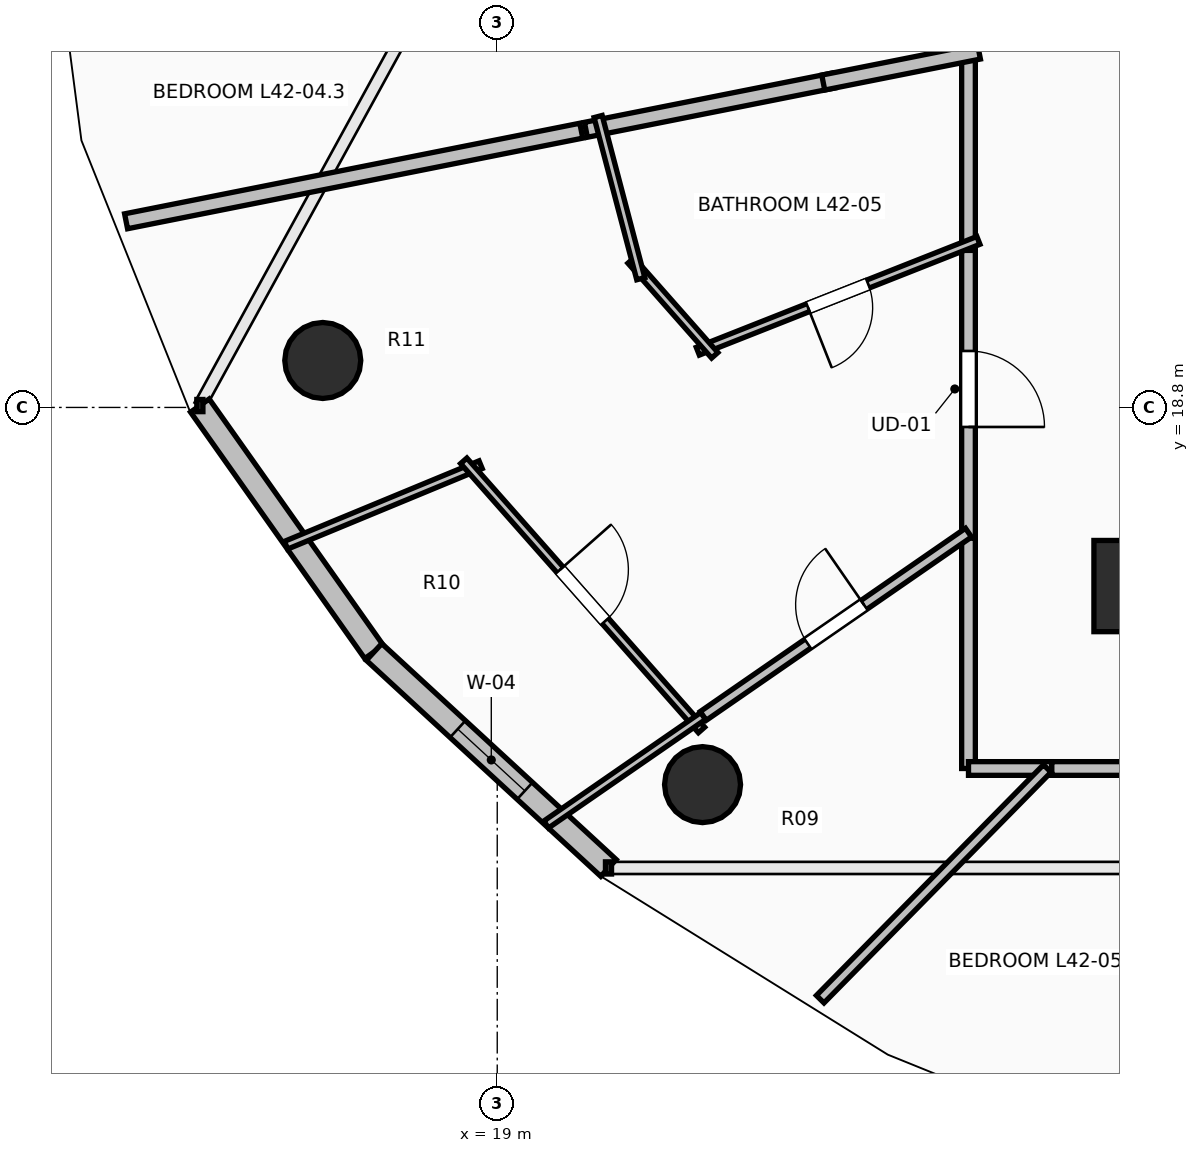
"""IFC4 building model, lengths in metres.
Left out: names, types, materials, properties, quantities, classifications, styles, units other than length and angle.
Written with IfcOpenShell. Run it as: python <this file> out.ifc"""

import sys

from ifc_helpers import new_model, si_unit, direction, frame, frame_2d, origin, origin_2d, place, context, subcontext, project, spatial, rectangle, circle, extrude, element, fill, save


model = new_model("IFC4")
c1 = context("Model", 3, precision=1e-05, world=origin(), true_north=direction((0.0, 1.0)))
c2 = subcontext(c1, "Body", "Model", "MODEL_VIEW")
j1 = project(units=[si_unit("LENGTHUNIT", "METRE"), si_unit("PLANEANGLEUNIT", "RADIAN")], contexts=[c1])
p1 = place(None, origin())
s1 = spatial("IfcSite", under=j1, at=p1, CompositionType="ELEMENT")
p2 = place(p1, origin())
s2 = spatial("IfcBuilding", under=s1, at=p2, CompositionType="ELEMENT")
p3 = place(p2, frame((0.0, 0.0, 157.1)))
s3 = spatial("IfcBuildingStorey", under=s2, at=p3, CompositionType="ELEMENT", Elevation=157.1)
for number, where, z_axis, x_axis in (
    (1, (16.705, 19.418, 0.0), (0.0, 0.0, 1.0), (-0.924, -0.383, 0.0)),
    (2, (21.701, 13.838, 0.0), (0.0, 0.0, 1.0), (-0.707, -0.707, 0.0)),
):
    element("IfcColumn", number, at=place(p3, frame(where, z_axis=z_axis, x_axis=x_axis)), inside=s3, PredefinedType="COLUMN", context=c2, shape_type="SweptSolid", body=[
        extrude(circle(Radius=0.5, at=origin_2d()), origin(), (0.0, 0.0, 1.0), 3.5),
    ])
p4 = place(p3, frame((27.25, 16.45, 0.0), z_axis=(0.0, 0.0, 1.0), x_axis=(1.0, 0.0, 0.0)))
e3 = element("IfcColumn", 3, at=p4, inside=s3, PredefinedType="PILASTER", context=c2, shape_type="SweptSolid", body=[
    extrude(rectangle(XDim=0.8, YDim=1.2, at=origin_2d()), origin(), (0.0, 0.0, 1.0), 3.5),
])
p5 = place(p3, frame((15.088, 18.825, 0.0), z_axis=(0.0, 0.0, 1.0), x_axis=(0.577269753207, -0.816553508371, 0.0)))
e4 = element("IfcWall", 4, at=p5, inside=s3, PredefinedType="STANDARD", context=c2, shape_type="SweptSolid", body=[
    extrude(rectangle(XDim=3.97, YDim=0.3, at=frame_2d((1.985, 0.0))), origin(), (0.0, 0.0, 1.0), 3.24),
])
p6 = place(p3, frame((17.38, 15.583, 0.0), z_axis=(0.0, 0.0, 1.0), x_axis=(0.735477154165, -0.677549522693, 0.0)))
e5 = element("IfcWall", 5, at=p6, inside=s3, PredefinedType="STANDARD", context=c2, shape_type="SweptSolid", body=[
    extrude(rectangle(XDim=4.194, YDim=0.3, at=frame_2d((2.097, 0.0))), origin(), (0.0, 0.0, 1.0), 3.24),
])
p7 = place(p6, frame((1.497, 0.0, 0.85)))
e6 = element("IfcOpeningElement", 6, at=p7, cuts=e5, PredefinedType="OPENING", context=c2, shape_type="SweptSolid", body=[
    extrude(rectangle(XDim=1.2, YDim=2.1, at=frame_2d((0.6, 1.05))), frame((0.0, 0.165, 0.0), z_axis=(0.0, -1.0, 0.0), x_axis=(1.0, 0.0, 0.0)), (0.0, 0.0, 1.0), 0.33),
])
p8 = place(p3, frame((25.2, 24.55, 0.0), z_axis=(0.0, 0.0, 1.0), x_axis=(0.0, -1.0, 0.0)))
e7 = element("IfcWall", 7, at=p8, inside=s3, PredefinedType="PARTITIONING", context=c2, shape_type="SweptSolid", body=[
    extrude(rectangle(XDim=1.157, YDim=0.18, at=frame_2d((0.579, 0.0))), origin(), (0.0, 0.0, 1.0), 3.24),
])
p9 = place(p3, frame((25.2, 21.006, 0.0), z_axis=(0.0, 0.0, 1.0), x_axis=(0.0, -1.0, 0.0)))
e8 = element("IfcWall", 8, at=p9, inside=s3, PredefinedType="PARTITIONING", context=c2, shape_type="SweptSolid", body=[
    extrude(rectangle(XDim=3.926, YDim=0.18, at=frame_2d((1.963, 0.0))), origin(), (0.0, 0.0, 1.0), 2.432),
])
p10 = place(p9, frame((1.463, 0.0, 0.0)))
e9 = element("IfcOpeningElement", 9, at=p10, cuts=e8, PredefinedType="OPENING", context=c2, shape_type="SweptSolid", body=[
    extrude(rectangle(XDim=1.0, YDim=2.15, at=frame_2d((0.5, 1.075))), frame((0.0, 0.105, 0.0), z_axis=(0.0, -1.0, 0.0), x_axis=(1.0, 0.0, 0.0)), (0.0, 0.0, 1.0), 0.21),
])
p11 = place(p3, frame((25.2, 23.533, 0.0), z_axis=(0.0, 0.0, 1.0), x_axis=(0.0, -1.0, 0.0)))
e10 = element("IfcWall", 10, at=p11, inside=s3, PredefinedType="PARTITIONING", context=c2, shape_type="SweptSolid", body=[
    extrude(rectangle(XDim=2.667, YDim=0.18, at=frame_2d((1.333, 0.0))), origin(), (0.0, 0.0, 1.0), 3.24),
])
p12 = place(p3, frame((25.2, 17.08, 0.0), z_axis=(0.0, 0.0, 1.0), x_axis=(0.0, -1.0, 0.0)))
e11 = element("IfcWall", 11, at=p12, inside=s3, PredefinedType="PARTITIONING", context=c2, shape_type="SweptSolid", body=[
    extrude(rectangle(XDim=3.03, YDim=0.18, at=frame_2d((1.515, 0.0))), origin(), (0.0, 0.0, 1.0), 2.432),
])
p13 = place(p3, frame((25.2, 14.05, 0.0), z_axis=(0.0, 0.0, 1.0), x_axis=(1.0, 0.0, 0.0)))
e12 = element("IfcWall", 12, at=p13, inside=s3, PredefinedType="PARTITIONING", context=c2, shape_type="SweptSolid", body=[
    extrude(rectangle(XDim=1.096, YDim=0.18, at=frame_2d((0.548, 0.0))), origin(), (0.0, 0.0, 1.0), 2.972),
])
p14 = place(p3, frame((26.296, 14.05, 0.0), z_axis=(0.0, 0.0, 1.0), x_axis=(1.0, 0.0, 0.0)))
e13 = element("IfcWall", 13, at=p14, inside=s3, PredefinedType="PARTITIONING", context=c2, shape_type="SweptSolid", body=[
    extrude(rectangle(XDim=3.779, YDim=0.18, at=frame_2d((1.89, 0.0))), origin(), (0.0, 0.0, 1.0), 2.432),
])
p15 = place(p14, frame((1.465, 0.0, 0.0)))
e14 = element("IfcOpeningElement", 14, at=p15, cuts=e13, PredefinedType="OPENING", context=c2, shape_type="SweptSolid", body=[
    extrude(rectangle(XDim=0.85, YDim=2.1, at=frame_2d((0.425, 1.05))), frame((0.0, 0.105, 0.0), z_axis=(0.0, -1.0, 0.0), x_axis=(1.0, 0.0, 0.0)), (0.0, 0.0, 1.0), 0.21),
])
p16 = place(p3, frame((14.117, 21.249, 0.0), z_axis=(0.0, 0.0, 1.0), x_axis=(0.980766298352, 0.19518572698, 0.0)))
e15 = element("IfcWall", 15, at=p16, inside=s3, PredefinedType="PARTITIONING", context=c2, shape_type="SweptSolid", body=[
    extrude(rectangle(XDim=6.106, YDim=0.2, at=frame_2d((3.053, 0.0))), origin(), (0.0, 0.0, 1.0), 2.728),
])
p17 = place(p3, frame((20.167, 22.453, 0.0), z_axis=(0.0, 0.0, 1.0), x_axis=(0.980766708229, 0.195183667423, 0.0)))
e16 = element("IfcWall", 16, at=p17, inside=s3, PredefinedType="PARTITIONING", context=c2, shape_type="SweptSolid", body=[
    extrude(rectangle(XDim=3.323, YDim=0.2, at=frame_2d((1.662, 0.0))), origin(), (0.0, 0.0, 1.0), 2.972),
])
p18 = place(p3, frame((23.289, 23.074, 0.0), z_axis=(0.0, 0.0, 1.0), x_axis=(0.980804842296, 0.194991951961, 0.0)))
e17 = element("IfcWall", 17, at=p18, inside=s3, PredefinedType="PARTITIONING", context=c2, shape_type="SweptSolid", body=[
    extrude(rectangle(XDim=2.088, YDim=0.2, at=frame_2d((1.044, 0.0))), origin(), (0.0, 0.0, 1.0), 2.886),
])
p19 = place(p3, frame((25.33, 20.997, 0.0), z_axis=(0.0, 0.0, 1.0), x_axis=(-0.930092731386, -0.367324803169, 0.0)))
e18 = element("IfcWall", 18, at=p19, inside=s3, PredefinedType="PARTITIONING", context=c2, shape_type="SweptSolid", body=[
    extrude(rectangle(XDim=3.969, YDim=0.11, at=frame_2d((1.984, 0.0))), origin(), (0.0, 0.0, 1.0), 2.886),
])
p20 = place(p19, frame((1.559, 0.0, 0.0)))
e19 = element("IfcOpeningElement", 19, at=p20, cuts=e18, PredefinedType="OPENING", context=c2, shape_type="SweptSolid", body=[
    extrude(rectangle(XDim=0.85, YDim=2.1, at=frame_2d((0.425, 1.05))), frame((0.0, 0.07, 0.0), z_axis=(0.0, -1.0, 0.0), x_axis=(1.0, 0.0, 0.0)), (0.0, 0.0, 1.0), 0.14),
])
p21 = place(p3, frame((21.862, 19.486, 0.0), z_axis=(0.0, 0.0, 1.0), x_axis=(-0.661645897528, 0.749816448396, 0.0)))
e20 = element("IfcWall", 20, at=p21, inside=s3, PredefinedType="PARTITIONING", context=c2, shape_type="SweptSolid", body=[
    extrude(rectangle(XDim=1.664, YDim=0.11, at=frame_2d((0.832, 0.0))), origin(), (0.0, 0.0, 1.0), 3.24),
])
p22 = place(p3, frame((20.889, 20.494, 0.0), z_axis=(0.0, 0.0, 1.0), x_axis=(-0.254389812051, 0.967101764823, 0.0)))
e21 = element("IfcWall", 21, at=p22, inside=s3, PredefinedType="PARTITIONING", context=c2, shape_type="SweptSolid", body=[
    extrude(rectangle(XDim=2.206, YDim=0.11, at=frame_2d((1.103, 0.0))), origin(), (0.0, 0.0, 1.0), 3.24),
])
p23 = place(p3, frame((16.222, 16.988, 0.0), z_axis=(0.0, 0.0, 1.0), x_axis=(0.924067287951, 0.382229835751, 0.0)))
e22 = element("IfcWall", 22, at=p23, inside=s3, PredefinedType="PARTITIONING", context=c2, shape_type="SweptSolid", body=[
    extrude(rectangle(XDim=2.77, YDim=0.11, at=frame_2d((1.385, 0.0))), origin(), (0.0, 0.0, 1.0), 2.728),
])
p24 = place(p3, frame((18.559, 18.098, 0.0), z_axis=(0.0, 0.0, 1.0), x_axis=(0.662122223318, -0.749395864272, 0.0)))
e23 = element("IfcWall", 23, at=p24, inside=s3, PredefinedType="PARTITIONING", context=c2, shape_type="SweptSolid", body=[
    extrude(rectangle(XDim=4.725, YDim=0.11, at=frame_2d((2.362, 0.0))), origin(), (0.0, 0.0, 1.0), 3.24),
])
p25 = place(p24, frame((1.912, 0.0, 0.0)))
e24 = element("IfcOpeningElement", 24, at=p25, cuts=e23, PredefinedType="OPENING", context=c2, shape_type="SweptSolid", body=[
    extrude(rectangle(XDim=0.9, YDim=2.1, at=frame_2d((0.45, 1.05))), frame((0.0, 0.07, 0.0), z_axis=(0.0, -1.0, 0.0), x_axis=(1.0, 0.0, 0.0)), (0.0, 0.0, 1.0), 0.14),
])
p26 = place(p3, frame((21.71, 14.742, 0.0), z_axis=(0.0, 0.0, 1.0), x_axis=(-0.822632807799, -0.568573006335, 0.0)))
e25 = element("IfcWall", 25, at=p26, inside=s3, PredefinedType="PARTITIONING", context=c2, shape_type="SweptSolid", body=[
    extrude(rectangle(XDim=2.512, YDim=0.11, at=frame_2d((1.256, 0.0))), origin(), (0.0, 0.0, 1.0), 2.728),
])
p27 = place(p3, frame((21.71, 14.741, 0.0), z_axis=(0.0, 0.0, 1.0), x_axis=(0.822672586971, 0.568515448027, 0.0)))
e26 = element("IfcWall", 26, at=p27, inside=s3, PredefinedType="PARTITIONING", context=c2, shape_type="SweptSolid", body=[
    extrude(rectangle(XDim=4.242, YDim=0.14, at=frame_2d((2.121, 0.0))), origin(), (0.0, 0.0, 1.0), 2.432),
])
p28 = place(p27, frame((1.671, 0.0, 0.0)))
e27 = element("IfcOpeningElement", 27, at=p28, cuts=e26, PredefinedType="OPENING", context=c2, shape_type="SweptSolid", body=[
    extrude(rectangle(XDim=0.9, YDim=2.1, at=frame_2d((0.45, 1.05))), frame((0.0, 0.085, 0.0), z_axis=(0.0, -1.0, 0.0), x_axis=(1.0, 0.0, 0.0)), (0.0, 0.0, 1.0), 0.17),
])
p29 = place(p3, frame((23.249, 11.015, 0.0), z_axis=(0.0, 0.0, 1.0), x_axis=(0.701437189486, 0.712731274188, 0.0)))
e28 = element("IfcWall", 28, at=p29, inside=s3, PredefinedType="PARTITIONING", context=c2, shape_type="SweptSolid", body=[
    extrude(rectangle(XDim=4.259, YDim=0.14, at=frame_2d((2.129, 0.0))), origin(), (0.0, 0.0, 1.0), 2.728),
])
p30 = place(p3, frame((26.869, 9.341, 0.0), z_axis=(0.0, 0.0, 1.0), x_axis=(0.555772359104, 0.831334520428, 0.0)))
e29 = element("IfcWall", 29, at=p30, inside=s3, PredefinedType="PARTITIONING", context=c2, shape_type="SweptSolid", body=[
    extrude(rectangle(XDim=1.103, YDim=0.2, at=frame_2d((0.552, 0.0))), origin(), (0.0, 0.0, 1.0), 3.24),
])
p31 = place(p7, origin())
e30 = element("IfcWindow", 30, at=p31, inside=s3, PartitioningType="SINGLE_PANEL", PredefinedType="WINDOW", context=c2, shape_type="SweptSolid", body=[
    extrude(rectangle(XDim=1.2, YDim=2.1, at=frame_2d((0.6, 1.05))), frame((0.0, 0.03, 0.0), z_axis=(0.0, -1.0, 0.0), x_axis=(1.0, 0.0, 0.0)), (0.0, 0.0, 1.0), 0.06),
])
fill(e6, e30)
p32 = place(p10, origin())
e31 = element("IfcDoor", 31, at=p32, inside=s3, OperationType="SINGLE_SWING_RIGHT", PredefinedType="DOOR", context=c2, shape_type="SweptSolid", body=[
    extrude(rectangle(XDim=1.0, YDim=2.15, at=frame_2d((0.5, 1.075))), frame((0.0, 0.025, 0.0), z_axis=(0.0, -1.0, 0.0), x_axis=(1.0, 0.0, 0.0)), (0.0, 0.0, 1.0), 0.05),
])
fill(e9, e31)
p33 = place(p20, origin())
e32 = element("IfcDoor", 32, at=p33, inside=s3, OperationType="SINGLE_SWING_RIGHT", PredefinedType="DOOR", context=c2, shape_type="SweptSolid", body=[
    extrude(rectangle(XDim=0.85, YDim=2.1, at=frame_2d((0.425, 1.05))), frame((0.0, 0.025, 0.0), z_axis=(0.0, -1.0, 0.0), x_axis=(1.0, 0.0, 0.0)), (0.0, 0.0, 1.0), 0.05),
])
fill(e19, e32)
p34 = place(p25, origin())
e33 = element("IfcDoor", 33, at=p34, inside=s3, OperationType="SINGLE_SWING_LEFT", PredefinedType="DOOR", context=c2, shape_type="SweptSolid", body=[
    extrude(rectangle(XDim=0.9, YDim=2.1, at=frame_2d((0.45, 1.05))), frame((0.0, 0.025, 0.0), z_axis=(0.0, -1.0, 0.0), x_axis=(1.0, 0.0, 0.0)), (0.0, 0.0, 1.0), 0.05),
])
fill(e24, e33)
p35 = place(p28, origin())
e34 = element("IfcDoor", 34, at=p35, inside=s3, OperationType="SINGLE_SWING_RIGHT", PredefinedType="DOOR", context=c2, shape_type="SweptSolid", body=[
    extrude(rectangle(XDim=0.9, YDim=2.1, at=frame_2d((0.45, 1.05))), frame((0.0, 0.025, 0.0), z_axis=(0.0, -1.0, 0.0), x_axis=(1.0, 0.0, 0.0)), (0.0, 0.0, 1.0), 0.05),
])
fill(e27, e34)
save(model, sys.argv[1])
